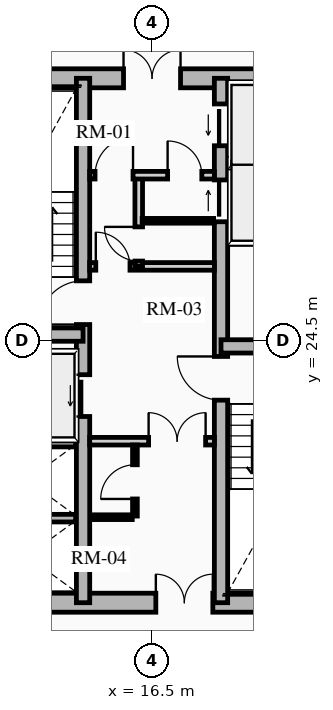
"""IFC4 building model, lengths in metres.
Left out: names, types, materials, properties, quantities, classifications, styles, units other than length and angle.
Written with IfcOpenShell. Run it as: python <this file> out.ifc"""

import sys

from ifc_helpers import new_model, si_unit, direction, frame, frame_2d, origin, place, context, subcontext, project, spatial, rectangle, extrude, source, transform, mapped, element, fill, save


model = new_model("IFC4")
c1 = context("Model", 3, precision=1e-05, world=origin(), true_north=direction((0.0, 1.0)))
c2 = subcontext(c1, "Body", "Model", "MODEL_VIEW")
j1 = project(units=[si_unit("LENGTHUNIT", "METRE"), si_unit("PLANEANGLEUNIT", "RADIAN")], contexts=[c1])
p1 = place(None, origin())
s1 = spatial("IfcSite", under=j1, at=p1, CompositionType="ELEMENT")
p2 = place(p1, origin())
s2 = spatial("IfcBuilding", under=s1, at=p2, CompositionType="ELEMENT")
p3 = place(p2, frame((0.0, 0.0, 54.01)))
s3 = spatial("IfcBuildingStorey", under=s2, at=p3, CompositionType="ELEMENT", Elevation=54.01)
p4 = place(p3, frame((11.15, 17.6, 0.0), z_axis=(0.0, 0.0, 1.0), x_axis=(1.0, 0.0, 0.0)))
e1 = element("IfcWall", 1, at=p4, inside=s3, PredefinedType="SHEAR", context=c2, shape_type="SweptSolid", body=[
    extrude(rectangle(XDim=10.7, YDim=0.5, at=frame_2d((5.35, 0.0))), origin(), (0.0, 0.0, 1.0), 2.91),
])
m1 = source(origin(), c2, "Body", "SweptSolid", [
    extrude(rectangle(XDim=1.5, YDim=2.02, at=frame_2d((0.75, 1.01))), frame((0.0, 0.26, 0.0), z_axis=(0.0, -1.0, 0.0), x_axis=(1.0, 0.0, 0.0)), (0.0, 0.0, 1.0), 0.52),
])
p5 = place(p4, frame((5.45, 0.0, 0.0)))
e2 = element("IfcOpeningElement", 2, at=p5, cuts=e1, PredefinedType="OPENING", context=c2, shape_type="MappedRepresentation", body=[
    mapped(m1, transform((0.0, 0.0, 0.0), x_axis=(1.0, 0.0, 0.0), y_axis=(0.0, 1.0, 0.0), z_axis=(0.0, 0.0, 1.0), scale=1.0)),
])
p6 = place(p3, frame((11.15, 31.4, 0.0), z_axis=(0.0, 0.0, 1.0), x_axis=(1.0, 0.0, 0.0)))
e3 = element("IfcWall", 3, at=p6, inside=s3, PredefinedType="SHEAR", context=c2, shape_type="SweptSolid", body=[
    extrude(rectangle(XDim=10.7, YDim=0.5, at=frame_2d((5.35, 0.0))), origin(), (0.0, 0.0, 1.0), 2.91),
])
p7 = place(p6, frame((4.6, 0.0, 0.0)))
e4 = element("IfcOpeningElement", 4, at=p7, cuts=e3, PredefinedType="OPENING", context=c2, shape_type="MappedRepresentation", body=[
    mapped(m1, transform((0.0, 0.0, 0.0), x_axis=(1.0, 0.0, 0.0), y_axis=(0.0, 1.0, 0.0), z_axis=(0.0, 0.0, 1.0), scale=1.0)),
])
p8 = place(p3, frame((14.685, 17.6, 0.0), z_axis=(0.0, 0.0, 1.0), x_axis=(0.0, 1.0, 0.0)))
e5 = element("IfcWall", 5, at=p8, inside=s3, PredefinedType="SHEAR", context=c2, shape_type="SweptSolid", body=[
    extrude(rectangle(XDim=13.8, YDim=0.35, at=frame_2d((6.9, 0.0))), origin(), (0.0, 0.0, 1.0), 2.91),
])
m2 = source(origin(), c2, "Body", "SweptSolid", [
    extrude(rectangle(XDim=1.1, YDim=2.015, at=frame_2d((0.55, 1.007))), frame((0.0, 0.185, 0.0), z_axis=(0.0, -1.0, 0.0), x_axis=(1.0, 0.0, 0.0)), (0.0, 0.0, 1.0), 0.37),
])
p9 = place(p8, frame((4.9, 0.0, 0.0)))
e6 = element("IfcOpeningElement", 6, at=p9, cuts=e5, PredefinedType="OPENING", context=c2, shape_type="MappedRepresentation", body=[
    mapped(m2, transform((0.0, 0.0, 0.0), x_axis=(1.0, 0.0, 0.0), y_axis=(0.0, 1.0, 0.0), z_axis=(0.0, 0.0, 1.0), scale=1.0)),
])
m3 = source(origin(), c2, "Body", "SweptSolid", [
    extrude(rectangle(XDim=1.15, YDim=2.02, at=frame_2d((0.575, 1.01))), frame((0.0, 0.185, 0.0), z_axis=(0.0, -1.0, 0.0), x_axis=(1.0, 0.0, 0.0)), (0.0, 0.0, 1.0), 0.37),
])
p10 = place(p8, frame((7.32, 0.0, 0.0)))
e7 = element("IfcOpeningElement", 7, at=p10, cuts=e5, PredefinedType="OPENING", context=c2, shape_type="MappedRepresentation", body=[
    mapped(m3, transform((0.0, 0.0, 0.0), x_axis=(1.0, 0.0, 0.0), y_axis=(0.0, 1.0, 0.0), z_axis=(0.0, 0.0, 1.0), scale=1.0)),
])
p11 = place(p3, frame((18.315, 17.6, 0.0), z_axis=(0.0, 0.0, 1.0), x_axis=(0.0, 1.0, 0.0)))
e8 = element("IfcWall", 8, at=p11, inside=s3, PredefinedType="SHEAR", context=c2, shape_type="SweptSolid", body=[
    extrude(rectangle(XDim=13.8, YDim=0.35, at=frame_2d((6.9, 0.0))), origin(), (0.0, 0.0, 1.0), 2.91),
])
p12 = place(p11, frame((10.025, 0.0, 0.0)))
e9 = element("IfcOpeningElement", 9, at=p12, cuts=e8, PredefinedType="OPENING", context=c2, shape_type="MappedRepresentation", body=[
    mapped(m2, transform((0.0, 0.0, 0.0), x_axis=(1.0, 0.0, 0.0), y_axis=(0.0, 1.0, 0.0), z_axis=(0.0, 0.0, 1.0), scale=1.0)),
])
p13 = place(p11, frame((12.025, 0.0, 0.0)))
e10 = element("IfcOpeningElement", 10, at=p13, cuts=e8, PredefinedType="OPENING", context=c2, shape_type="MappedRepresentation", body=[
    mapped(m2, transform((0.0, 0.0, 0.0), x_axis=(1.0, 0.0, 0.0), y_axis=(0.0, 1.0, 0.0), z_axis=(0.0, 0.0, 1.0), scale=1.0)),
])
p14 = place(p11, frame((5.33, 0.0, 0.0)))
e11 = element("IfcOpeningElement", 11, at=p14, cuts=e8, PredefinedType="OPENING", context=c2, shape_type="MappedRepresentation", body=[
    mapped(m3, transform((0.0, 0.0, 0.0), x_axis=(1.0, 0.0, 0.0), y_axis=(0.0, 1.0, 0.0), z_axis=(0.0, 0.0, 1.0), scale=1.0)),
])
for number, where, z_axis, x_axis in (
    (12, (11.4, 24.655, 0.0), (0.0, 0.0, 1.0), (1.0, 0.0, 0.0)),
    (13, (18.315, 24.345, 0.0), (0.0, 0.0, 1.0), (1.0, 0.0, 0.0)),
):
    element("IfcWall", number, at=place(p3, frame(where, z_axis=z_axis, x_axis=x_axis)), inside=s3, PredefinedType="SHEAR", context=c2, shape_type="SweptSolid", body=[
        extrude(rectangle(XDim=3.285, YDim=0.35, at=frame_2d((1.643, 0.0))), origin(), (0.0, 0.0, 1.0), 2.91),
    ])
for number, where, z_axis, x_axis in (
    (14, (11.52, 21.8, 0.0), (0.0, 0.0, 1.0), (1.0, 0.0, 0.0)),
    (15, (11.52, 19.825, 0.0), (0.0, 0.0, 1.0), (1.0, 0.0, 0.0)),
    (16, (18.51, 27.13, 0.0), (0.0, 0.0, 1.0), (1.0, 0.0, 0.0)),
    (17, (18.51, 29.175, 0.0), (0.0, 0.0, 1.0), (1.0, 0.0, 0.0)),
):
    element("IfcWall", number, at=place(p3, frame(where, z_axis=z_axis, x_axis=x_axis)), inside=s3, PredefinedType="SHEAR", context=c2, shape_type="SweptSolid", body=[
        extrude(rectangle(XDim=2.97, YDim=0.2, at=frame_2d((1.485, 0.0))), origin(), (0.0, 0.0, 1.0), 2.91),
    ])
p15 = place(p3, frame((14.86, 21.85, 0.0), z_axis=(0.0, 0.0, 1.0), x_axis=(1.0, 0.0, 0.0)))
e18 = element("IfcWall", 18, at=p15, inside=s3, PredefinedType="PARTITIONING", context=c2, shape_type="SweptSolid", body=[
    extrude(rectangle(XDim=3.28, YDim=0.2, at=frame_2d((1.64, 0.0))), origin(), (0.0, 0.0, 1.0), 2.635),
])
m4 = source(origin(), c2, "Body", "SweptSolid", [
    extrude(rectangle(XDim=1.5, YDim=2.02, at=frame_2d((0.75, 1.01))), frame((0.0, 0.11, 0.0), z_axis=(0.0, -1.0, 0.0), x_axis=(1.0, 0.0, 0.0)), (0.0, 0.0, 1.0), 0.22),
])
p16 = place(p15, frame((1.55, 0.0, 0.0)))
e19 = element("IfcOpeningElement", 19, at=p16, cuts=e18, PredefinedType="OPENING", context=c2, shape_type="MappedRepresentation", body=[
    mapped(m4, transform((0.0, 0.0, 0.0), x_axis=(1.0, 0.0, 0.0), y_axis=(0.0, 1.0, 0.0), z_axis=(0.0, 0.0, 1.0), scale=1.0)),
])
p17 = place(p3, frame((14.86, 26.45, 0.0), z_axis=(0.0, 0.0, 1.0), x_axis=(1.0, 0.0, 0.0)))
e20 = element("IfcWall", 20, at=p17, inside=s3, PredefinedType="PARTITIONING", context=c2, shape_type="SweptSolid", body=[
    extrude(rectangle(XDim=3.28, YDim=0.2, at=frame_2d((1.64, 0.0))), origin(), (0.0, 0.0, 1.0), 2.635),
])
m5 = source(origin(), c2, "Body", "SweptSolid", [
    extrude(rectangle(XDim=0.9, YDim=2.005, at=frame_2d((0.45, 1.002))), frame((0.0, 0.11, 0.0), z_axis=(0.0, -1.0, 0.0), x_axis=(1.0, 0.0, 0.0)), (0.0, 0.0, 1.0), 0.22),
])
p18 = place(p17, frame((0.16, 0.0, 0.0)))
e21 = element("IfcOpeningElement", 21, at=p18, cuts=e20, PredefinedType="OPENING", context=c2, shape_type="MappedRepresentation", body=[
    mapped(m5, transform((0.0, 0.0, 0.0), x_axis=(1.0, 0.0, 0.0), y_axis=(0.0, 1.0, 0.0), z_axis=(0.0, 0.0, 1.0), scale=1.0)),
])
p19 = place(p3, frame((16.15, 26.45, 0.0), z_axis=(0.0, 0.0, 1.0), x_axis=(0.0, 1.0, 0.0)))
e22 = element("IfcWall", 22, at=p19, inside=s3, PredefinedType="PARTITIONING", context=c2, shape_type="SweptSolid", body=[
    extrude(rectangle(XDim=2.4, YDim=0.2, at=frame_2d((1.2, 0.0))), origin(), (0.0, 0.0, 1.0), 2.635),
])
p20 = place(p19, frame((0.14, 0.0, 0.0)))
e23 = element("IfcOpeningElement", 23, at=p20, cuts=e22, PredefinedType="OPENING", context=c2, shape_type="MappedRepresentation", body=[
    mapped(m5, transform((0.0, 0.0, 0.0), x_axis=(1.0, 0.0, 0.0), y_axis=(0.0, 1.0, 0.0), z_axis=(0.0, 0.0, 1.0), scale=1.0)),
])
p21 = place(p3, frame((14.86, 28.85, 0.0), z_axis=(0.0, 0.0, 1.0), x_axis=(1.0, 0.0, 0.0)))
e24 = element("IfcWall", 24, at=p21, inside=s3, PredefinedType="PARTITIONING", context=c2, shape_type="SweptSolid", body=[
    extrude(rectangle(XDim=3.28, YDim=0.2, at=frame_2d((1.64, 0.0))), origin(), (0.0, 0.0, 1.0), 2.635),
])
m6 = source(origin(), c2, "Body", "SweptSolid", [
    extrude(rectangle(XDim=1.0, YDim=2.015, at=frame_2d((0.5, 1.007))), frame((0.0, 0.11, 0.0), z_axis=(0.0, -1.0, 0.0), x_axis=(1.0, 0.0, 0.0)), (0.0, 0.0, 1.0), 0.22),
])
p22 = place(p21, frame((0.14, 0.0, 0.0)))
e25 = element("IfcOpeningElement", 25, at=p22, cuts=e24, PredefinedType="OPENING", context=c2, shape_type="MappedRepresentation", body=[
    mapped(m6, transform((0.0, 0.0, 0.0), x_axis=(1.0, 0.0, 0.0), y_axis=(0.0, 1.0, 0.0), z_axis=(0.0, 0.0, 1.0), scale=1.0)),
])
p23 = place(p21, frame((2.05, 0.0, 0.0)))
e26 = element("IfcOpeningElement", 26, at=p23, cuts=e24, PredefinedType="OPENING", context=c2, shape_type="MappedRepresentation", body=[
    mapped(m5, transform((0.0, 0.0, 0.0), x_axis=(1.0, 0.0, 0.0), y_axis=(0.0, 1.0, 0.0), z_axis=(0.0, 0.0, 1.0), scale=1.0)),
])
p24 = place(p3, frame((16.05, 19.88, 0.0), z_axis=(0.0, 0.0, 1.0), x_axis=(0.0, 1.0, 0.0)))
e27 = element("IfcWall", 27, at=p24, inside=s3, PredefinedType="PARTITIONING", context=c2, shape_type="SweptSolid", body=[
    extrude(rectangle(XDim=1.87, YDim=0.125, at=frame_2d((0.935, 0.0))), origin(), (0.0, 0.0, 1.0), 2.635),
])
m7 = source(origin(), c2, "Body", "SweptSolid", [
    extrude(rectangle(XDim=0.9, YDim=2.005, at=frame_2d((0.45, 1.002))), frame((0.0, 0.073, 0.0), z_axis=(0.0, -1.0, 0.0), x_axis=(1.0, 0.0, 0.0)), (0.0, 0.0, 1.0), 0.145),
])
p25 = place(p24, frame((0.45, 0.0, 0.0)))
e28 = element("IfcOpeningElement", 28, at=p25, cuts=e27, PredefinedType="OPENING", context=c2, shape_type="MappedRepresentation", body=[
    mapped(m7, transform((0.0, 0.0, 0.0), x_axis=(1.0, 0.0, 0.0), y_axis=(0.0, 1.0, 0.0), z_axis=(0.0, 0.0, 1.0), scale=1.0)),
])
p26 = place(p3, frame((14.88, 19.85, 0.0), z_axis=(0.0, 0.0, 1.0), x_axis=(1.0, 0.0, 0.0)))
e29 = element("IfcWall", 29, at=p26, inside=s3, PredefinedType="PARTITIONING", context=c2, shape_type="SweptSolid", body=[
    extrude(rectangle(XDim=1.1, YDim=0.125, at=frame_2d((0.55, 0.0))), origin(), (0.0, 0.0, 1.0), 2.635),
])
p27 = place(p3, frame((16.24, 27.65, 0.0), z_axis=(0.0, 0.0, 1.0), x_axis=(1.0, 0.0, 0.0)))
e30 = element("IfcWall", 30, at=p27, inside=s3, PredefinedType="PARTITIONING", context=c2, shape_type="SweptSolid", body=[
    extrude(rectangle(XDim=1.88, YDim=0.125, at=frame_2d((0.94, 0.0))), origin(), (0.0, 0.0, 1.0), 2.635),
])
m8 = source(origin(), c2, "Body", "SweptSolid", [
    extrude(rectangle(XDim=1.1, YDim=2.015, at=frame_2d((0.55, 1.007))), frame((0.0, 0.025, 0.0), z_axis=(0.0, -1.0, 0.0), x_axis=(1.0, 0.0, 0.0)), (0.0, 0.0, 1.0), 0.05),
])
p28 = place(p9, origin())
e31 = element("IfcDoor", 31, at=p28, inside=s3, OperationType="SLIDING_TO_LEFT", PredefinedType="DOOR", context=c2, shape_type="MappedRepresentation", body=[
    mapped(m8, transform((0.0, 0.0, 0.0), x_axis=(1.0, 0.0, 0.0), y_axis=(0.0, 1.0, 0.0), z_axis=(0.0, 0.0, 1.0), scale=1.0)),
])
fill(e6, e31)
p29 = place(p12, origin())
e32 = element("IfcDoor", 32, at=p29, inside=s3, OperationType="SLIDING_TO_RIGHT", PredefinedType="DOOR", context=c2, shape_type="MappedRepresentation", body=[
    mapped(m8, transform((0.0, 0.0, 0.0), x_axis=(1.0, 0.0, 0.0), y_axis=(0.0, 1.0, 0.0), z_axis=(0.0, 0.0, 1.0), scale=1.0)),
])
fill(e9, e32)
p30 = place(p13, origin())
e33 = element("IfcDoor", 33, at=p30, inside=s3, OperationType="SLIDING_TO_LEFT", PredefinedType="DOOR", context=c2, shape_type="MappedRepresentation", body=[
    mapped(m8, transform((0.0, 0.0, 0.0), x_axis=(1.0, 0.0, 0.0), y_axis=(0.0, 1.0, 0.0), z_axis=(0.0, 0.0, 1.0), scale=1.0)),
])
fill(e10, e33)
m9 = source(origin(), c2, "Body", "SweptSolid", [
    extrude(rectangle(XDim=1.15, YDim=2.02, at=frame_2d((0.575, 1.01))), frame((0.0, 0.025, 0.0), z_axis=(0.0, -1.0, 0.0), x_axis=(1.0, 0.0, 0.0)), (0.0, 0.0, 1.0), 0.05),
])
p31 = place(p10, origin())
e34 = element("IfcDoor", 34, at=p31, inside=s3, OperationType="SINGLE_SWING_LEFT", PredefinedType="DOOR", context=c2, shape_type="MappedRepresentation", body=[
    mapped(m9, transform((0.0, 0.0, 0.0), x_axis=(1.0, 0.0, 0.0), y_axis=(0.0, 1.0, 0.0), z_axis=(0.0, 0.0, 1.0), scale=1.0)),
])
fill(e7, e34)
p32 = place(p14, origin())
e35 = element("IfcDoor", 35, at=p32, inside=s3, OperationType="SINGLE_SWING_RIGHT", PredefinedType="DOOR", context=c2, shape_type="MappedRepresentation", body=[
    mapped(m9, transform((0.0, 0.0, 0.0), x_axis=(1.0, 0.0, 0.0), y_axis=(0.0, 1.0, 0.0), z_axis=(0.0, 0.0, 1.0), scale=1.0)),
])
fill(e11, e35)
m10 = source(origin(), c2, "Body", "SweptSolid", [
    extrude(rectangle(XDim=1.5, YDim=2.02, at=frame_2d((0.75, 1.01))), frame((0.0, 0.025, 0.0), z_axis=(0.0, -1.0, 0.0), x_axis=(1.0, 0.0, 0.0)), (0.0, 0.0, 1.0), 0.05),
])
p33 = place(p7, origin())
e36 = element("IfcDoor", 36, at=p33, inside=s3, OperationType="DOUBLE_DOOR_SINGLE_SWING", PredefinedType="DOOR", context=c2, shape_type="MappedRepresentation", body=[
    mapped(m10, transform((0.0, 0.0, 0.0), x_axis=(1.0, 0.0, 0.0), y_axis=(0.0, 1.0, 0.0), z_axis=(0.0, 0.0, 1.0), scale=1.0)),
])
fill(e4, e36)
p34 = place(p5, origin())
e37 = element("IfcDoor", 37, at=p34, inside=s3, OperationType="DOUBLE_DOOR_SINGLE_SWING", PredefinedType="DOOR", context=c2, shape_type="MappedRepresentation", body=[
    mapped(m10, transform((0.0, 0.0, 0.0), x_axis=(1.0, 0.0, 0.0), y_axis=(0.0, 1.0, 0.0), z_axis=(0.0, 0.0, 1.0), scale=1.0)),
])
fill(e2, e37)
p35 = place(p16, origin())
e38 = element("IfcDoor", 38, at=p35, inside=s3, OperationType="DOUBLE_DOOR_SINGLE_SWING", PredefinedType="DOOR", context=c2, shape_type="MappedRepresentation", body=[
    mapped(m10, transform((0.0, 0.0, 0.0), x_axis=(1.0, 0.0, 0.0), y_axis=(0.0, 1.0, 0.0), z_axis=(0.0, 0.0, 1.0), scale=1.0)),
])
fill(e19, e38)
m11 = source(origin(), c2, "Body", "SweptSolid", [
    extrude(rectangle(XDim=0.9, YDim=2.005, at=frame_2d((0.45, 1.002))), frame((0.0, 0.025, 0.0), z_axis=(0.0, -1.0, 0.0), x_axis=(1.0, 0.0, 0.0)), (0.0, 0.0, 1.0), 0.05),
])
p36 = place(p18, origin())
e39 = element("IfcDoor", 39, at=p36, inside=s3, OperationType="SINGLE_SWING_LEFT", PredefinedType="DOOR", context=c2, shape_type="MappedRepresentation", body=[
    mapped(m11, transform((0.0, 0.0, 0.0), x_axis=(1.0, 0.0, 0.0), y_axis=(0.0, 1.0, 0.0), z_axis=(0.0, 0.0, 1.0), scale=1.0)),
])
fill(e21, e39)
m12 = source(origin(), c2, "Body", "SweptSolid", [
    extrude(rectangle(XDim=1.0, YDim=2.015, at=frame_2d((0.5, 1.007))), frame((0.0, 0.025, 0.0), z_axis=(0.0, -1.0, 0.0), x_axis=(1.0, 0.0, 0.0)), (0.0, 0.0, 1.0), 0.05),
])
p37 = place(p22, origin())
e40 = element("IfcDoor", 40, at=p37, inside=s3, OperationType="SINGLE_SWING_RIGHT", PredefinedType="DOOR", context=c2, shape_type="MappedRepresentation", body=[
    mapped(m12, transform((0.0, 0.0, 0.0), x_axis=(1.0, 0.0, 0.0), y_axis=(0.0, 1.0, 0.0), z_axis=(0.0, 0.0, 1.0), scale=1.0)),
])
fill(e25, e40)
p38 = place(p25, origin())
e41 = element("IfcDoor", 41, at=p38, inside=s3, OperationType="SINGLE_SWING_LEFT", PredefinedType="DOOR", context=c2, shape_type="MappedRepresentation", body=[
    mapped(m11, transform((0.0, 0.0, 0.0), x_axis=(1.0, 0.0, 0.0), y_axis=(0.0, 1.0, 0.0), z_axis=(0.0, 0.0, 1.0), scale=1.0)),
])
fill(e28, e41)
p39 = place(p20, origin())
e42 = element("IfcDoor", 42, at=p39, inside=s3, OperationType="SINGLE_SWING_RIGHT", PredefinedType="DOOR", context=c2, shape_type="MappedRepresentation", body=[
    mapped(m11, transform((0.0, 0.0, 0.0), x_axis=(1.0, 0.0, 0.0), y_axis=(0.0, 1.0, 0.0), z_axis=(0.0, 0.0, 1.0), scale=1.0)),
])
fill(e23, e42)
p40 = place(p23, origin())
e43 = element("IfcDoor", 43, at=p40, inside=s3, OperationType="SINGLE_SWING_LEFT", PredefinedType="DOOR", context=c2, shape_type="MappedRepresentation", body=[
    mapped(m11, transform((0.0, 0.0, 0.0), x_axis=(1.0, 0.0, 0.0), y_axis=(0.0, 1.0, 0.0), z_axis=(0.0, 0.0, 1.0), scale=1.0)),
])
fill(e26, e43)
save(model, sys.argv[1])
